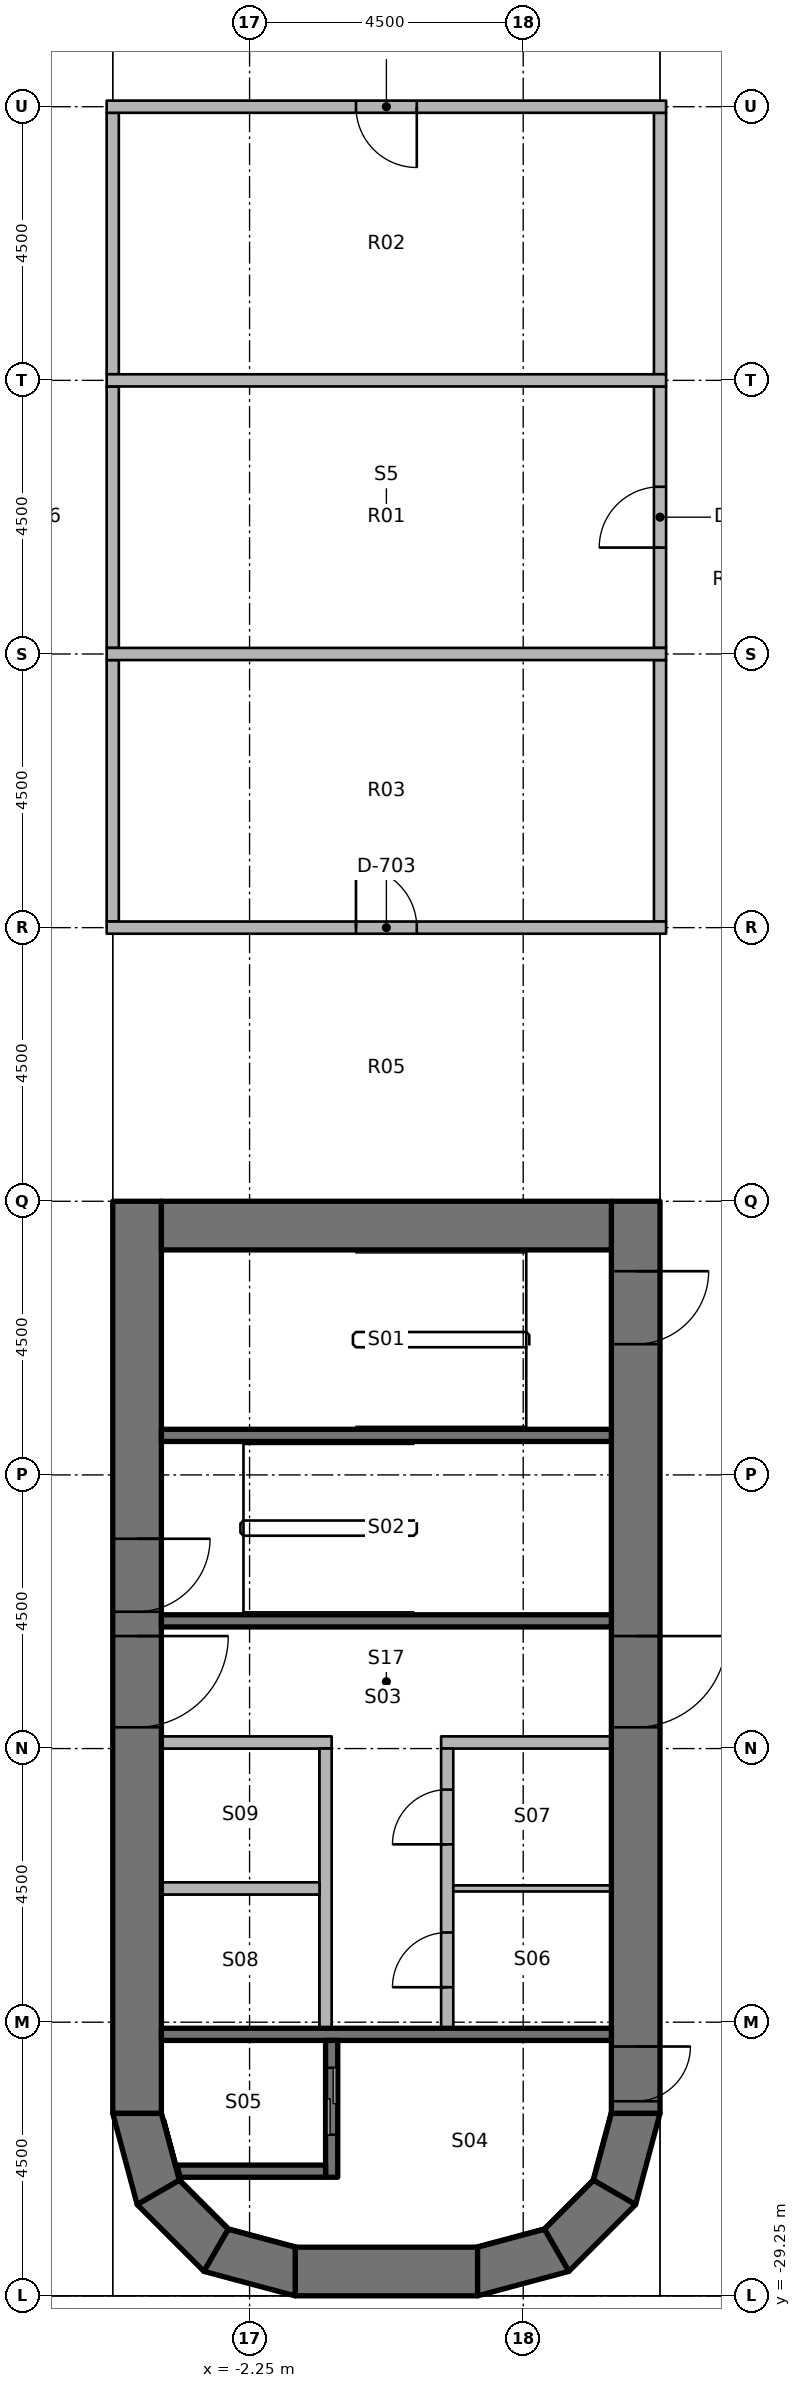
"""IFC4 building model, lengths in metres.
Left out: names, types, materials, properties, quantities, classifications, styles, units other than length and angle.
Written with IfcOpenShell. Run it as: python <this file> out.ifc"""

import sys

from ifc_helpers import new_model, si_unit, direction, frame, frame_2d, origin, place, context, subcontext, project, spatial, polyline, rectangle, outline, extrude, element, fill, save


model = new_model("IFC4")
c1 = context("Model", 3, precision=1e-05, world=origin(), true_north=direction((0.0, 1.0)))
c2 = subcontext(c1, "Body", "Model", "MODEL_VIEW")
j1 = project(units=[si_unit("LENGTHUNIT", "METRE"), si_unit("PLANEANGLEUNIT", "RADIAN")], contexts=[c1])
p1 = place(None, origin())
s1 = spatial("IfcSite", under=j1, at=p1, CompositionType="ELEMENT")
p2 = place(p1, origin())
s2 = spatial("IfcBuilding", under=s1, at=p2, CompositionType="ELEMENT")
p3 = place(p2, frame((0.0, 0.0, 94.2)))
s3 = spatial("IfcBuildingStorey", under=s2, at=p3, CompositionType="ELEMENT", Elevation=94.2)
p4 = place(p3, frame((-4.1, -11.25, 0.0), z_axis=(0.0, 0.0, 1.0), x_axis=(0.0, -1.0, 0.0)))
e1 = element("IfcWall", 1, at=p4, inside=s3, PredefinedType="SHEAR", context=c2, shape_type="SweptSolid", body=[
    extrude(rectangle(XDim=15.0, YDim=0.8, at=frame_2d((7.5, 0.0))), origin(), (0.0, 0.0, 1.0), 3.8),
])
p5 = place(p4, frame((7.15, 0.0, 0.0)))
e2 = element("IfcOpeningElement", 2, at=p5, cuts=e1, PredefinedType="OPENING", context=c2, shape_type="SweptSolid", body=[
    extrude(rectangle(XDim=1.5, YDim=2.3, at=frame_2d((0.75, 1.15))), frame((0.0, 0.41, 0.0), z_axis=(0.0, -1.0, 0.0), x_axis=(1.0, 0.0, 0.0)), (0.0, 0.0, 1.0), 0.82),
])
p6 = place(p4, frame((5.55, 0.0, 0.0)))
e3 = element("IfcOpeningElement", 3, at=p6, cuts=e1, PredefinedType="OPENING", context=c2, shape_type="SweptSolid", body=[
    extrude(rectangle(XDim=1.2, YDim=2.1, at=frame_2d((0.6, 1.05))), frame((0.0, 0.41, 0.0), z_axis=(0.0, -1.0, 0.0), x_axis=(1.0, 0.0, 0.0)), (0.0, 0.0, 1.0), 0.82),
])
p7 = place(p3, frame((4.1, -11.25, 0.0), z_axis=(0.0, 0.0, 1.0), x_axis=(0.0, -1.0, 0.0)))
e4 = element("IfcWall", 4, at=p7, inside=s3, PredefinedType="SHEAR", context=c2, shape_type="SweptSolid", body=[
    extrude(rectangle(XDim=15.0, YDim=0.8, at=frame_2d((7.5, 0.0))), origin(), (0.0, 0.0, 1.0), 3.8),
])
p8 = place(p7, frame((7.15, 0.0, 0.0)))
e5 = element("IfcOpeningElement", 5, at=p8, cuts=e4, PredefinedType="OPENING", context=c2, shape_type="SweptSolid", body=[
    extrude(rectangle(XDim=1.5, YDim=2.3, at=frame_2d((0.75, 1.15))), frame((0.0, 0.41, 0.0), z_axis=(0.0, -1.0, 0.0), x_axis=(1.0, 0.0, 0.0)), (0.0, 0.0, 1.0), 0.82),
])
p9 = place(p7, frame((13.9, 0.0, 0.0)))
e6 = element("IfcOpeningElement", 6, at=p9, cuts=e4, PredefinedType="OPENING", context=c2, shape_type="SweptSolid", body=[
    extrude(rectangle(XDim=0.9, YDim=2.1, at=frame_2d((0.45, 1.05))), frame((0.0, 0.41, 0.0), z_axis=(0.0, -1.0, 0.0), x_axis=(1.0, 0.0, 0.0)), (0.0, 0.0, 1.0), 0.82),
])
p10 = place(p7, frame((1.15, 0.0, 0.0)))
e7 = element("IfcOpeningElement", 7, at=p10, cuts=e4, PredefinedType="OPENING", context=c2, shape_type="SweptSolid", body=[
    extrude(rectangle(XDim=1.2, YDim=2.1, at=frame_2d((0.6, 1.05))), frame((0.0, 0.41, 0.0), z_axis=(0.0, -1.0, 0.0), x_axis=(1.0, 0.0, 0.0)), (0.0, 0.0, 1.0), 0.82),
])
p11 = place(p3, frame((-3.7, -11.65, 0.0), z_axis=(0.0, 0.0, 1.0), x_axis=(1.0, 0.0, 0.0)))
e8 = element("IfcWall", 8, at=p11, inside=s3, PredefinedType="SHEAR", context=c2, shape_type="SweptSolid", body=[
    extrude(rectangle(XDim=7.4, YDim=0.8, at=frame_2d((3.7, 0.0))), origin(), (0.0, 0.0, 1.0), 3.8),
])
p12 = place(p3, frame((-1.5, -28.85, 0.0), z_axis=(0.0, 0.0, 1.0), x_axis=(1.0, 0.0, 0.0)))
e9 = element("IfcWall", 9, at=p12, inside=s3, PredefinedType="SHEAR", context=c2, shape_type="SweptSolid", body=[
    extrude(rectangle(XDim=3.0, YDim=0.8, at=frame_2d((1.5, 0.0))), origin(), (0.0, 0.0, 1.0), 3.8),
])
p13 = place(p3, origin())
e10 = element("IfcWall", 10, at=p13, inside=s3, PredefinedType="SHEAR", context=c2, shape_type="SweptSolid", body=[
    extrude(outline(polyline([(-4.5, -26.25), (-4.098, -27.75), (-3.405, -27.35), (-3.7, -26.25), (-4.5, -26.25)])), origin(), (0.0, 0.0, 1.0), 3.8),
])
p14 = place(p3, origin())
e11 = element("IfcWall", 11, at=p14, inside=s3, PredefinedType="SHEAR", context=c2, shape_type="SweptSolid", body=[
    extrude(outline(polyline([(-4.098, -27.75), (-3.0, -28.848), (-2.6, -28.155), (-3.405, -27.35), (-4.098, -27.75)])), origin(), (0.0, 0.0, 1.0), 3.8),
])
p15 = place(p3, origin())
e12 = element("IfcWall", 12, at=p15, inside=s3, PredefinedType="SHEAR", context=c2, shape_type="SweptSolid", body=[
    extrude(outline(polyline([(-3.0, -28.848), (-1.5, -29.25), (-1.5, -28.45), (-2.6, -28.155), (-3.0, -28.848)])), origin(), (0.0, 0.0, 1.0), 3.8),
])
p16 = place(p3, origin())
e13 = element("IfcWall", 13, at=p16, inside=s3, PredefinedType="SHEAR", context=c2, shape_type="SweptSolid", body=[
    extrude(outline(polyline([(4.5, -26.25), (4.098, -27.75), (3.405, -27.35), (3.7, -26.25), (4.5, -26.25)])), origin(), (0.0, 0.0, 1.0), 3.8),
])
p17 = place(p3, origin())
e14 = element("IfcWall", 14, at=p17, inside=s3, PredefinedType="SHEAR", context=c2, shape_type="SweptSolid", body=[
    extrude(outline(polyline([(4.098, -27.75), (3.0, -28.848), (2.6, -28.155), (3.405, -27.35), (4.098, -27.75)])), origin(), (0.0, 0.0, 1.0), 3.8),
])
p18 = place(p3, origin())
e15 = element("IfcWall", 15, at=p18, inside=s3, PredefinedType="SHEAR", context=c2, shape_type="SweptSolid", body=[
    extrude(outline(polyline([(3.0, -28.848), (1.5, -29.25), (1.5, -28.45), (2.6, -28.155), (3.0, -28.848)])), origin(), (0.0, 0.0, 1.0), 3.8),
])
p19 = place(p3, frame((3.7, -24.95, 0.0), z_axis=(0.0, 0.0, 1.0), x_axis=(-1.0, 0.0, 0.0)))
e16 = element("IfcWall", 16, at=p19, inside=s3, PredefinedType="SHEAR", context=c2, shape_type="SweptSolid", body=[
    extrude(rectangle(XDim=7.4, YDim=0.2, at=frame_2d((3.7, 0.0))), origin(), (0.0, 0.0, 1.0), 3.65),
])
p20 = place(p3, frame((-0.9, -27.3, 0.0), z_axis=(0.0, 0.0, 1.0), x_axis=(0.0, 1.0, 0.0)))
e17 = element("IfcWall", 17, at=p20, inside=s3, PredefinedType="SHEAR", context=c2, shape_type="SweptSolid", body=[
    extrude(rectangle(XDim=2.25, YDim=0.2, at=frame_2d((1.125, 0.0))), origin(), (0.0, 0.0, 1.0), 3.65),
])
p21 = place(p20, frame((0.7, 0.0, 0.0)))
e18 = element("IfcOpeningElement", 18, at=p21, cuts=e17, PredefinedType="OPENING", context=c2, shape_type="SweptSolid", body=[
    extrude(rectangle(XDim=1.1, YDim=2.3, at=frame_2d((0.55, 1.15))), frame((0.0, 0.11, 0.0), z_axis=(0.0, -1.0, 0.0), x_axis=(1.0, 0.0, 0.0)), (0.0, 0.0, 1.0), 0.22),
])
p22 = place(p3, origin())
e19 = element("IfcWall", 19, at=p22, inside=s3, PredefinedType="SHEAR", context=c2, shape_type="SweptSolid", body=[
    extrude(outline(polyline([(-1.0, -27.1), (-3.444, -27.1), (-3.39, -27.3), (-1.0, -27.3), (-1.0, -27.1)])), origin(), (0.0, 0.0, 1.0), 3.65),
])
for number, where, z_axis, x_axis in (
    (20, (3.7, -18.15, 0.0), (0.0, 0.0, 1.0), (-1.0, 0.0, 0.0)),
    (21, (3.7, -15.1, 0.0), (0.0, 0.0, 1.0), (-1.0, 0.0, 0.0)),
):
    element("IfcWall", number, at=place(p3, frame(where, z_axis=z_axis, x_axis=x_axis)), inside=s3, PredefinedType="SHEAR", context=c2, shape_type="SweptSolid", body=[
        extrude(rectangle(XDim=7.4, YDim=0.2, at=frame_2d((3.7, 0.0))), origin(), (0.0, 0.0, 1.0), 3.65),
    ])
p23 = place(p3, frame((3.7, -20.15, 0.0), z_axis=(0.0, 0.0, 1.0), x_axis=(-1.0, 0.0, 0.0)))
e22 = element("IfcWall", 22, at=p23, inside=s3, PredefinedType="PARTITIONING", context=c2, shape_type="SweptSolid", body=[
    extrude(rectangle(XDim=2.8, YDim=0.2, at=frame_2d((1.4, 0.0))), origin(), (0.0, 0.0, 1.0), 3.65),
])
p24 = place(p3, frame((1.0, -24.85, 0.0), z_axis=(0.0, 0.0, 1.0), x_axis=(0.0, 1.0, 0.0)))
e23 = element("IfcWall", 23, at=p24, inside=s3, PredefinedType="PARTITIONING", context=c2, shape_type="SweptSolid", body=[
    extrude(rectangle(XDim=4.6, YDim=0.2, at=frame_2d((2.3, 0.0))), origin(), (0.0, 0.0, 1.0), 3.65),
])
p25 = place(p24, frame((0.675, 0.0, 0.0)))
e24 = element("IfcOpeningElement", 24, at=p25, cuts=e23, PredefinedType="OPENING", context=c2, shape_type="SweptSolid", body=[
    extrude(rectangle(XDim=0.9, YDim=2.1, at=frame_2d((0.45, 1.05))), frame((0.0, 0.11, 0.0), z_axis=(0.0, -1.0, 0.0), x_axis=(1.0, 0.0, 0.0)), (0.0, 0.0, 1.0), 0.22),
])
p26 = place(p24, frame((3.025, 0.0, 0.0)))
e25 = element("IfcOpeningElement", 25, at=p26, cuts=e23, PredefinedType="OPENING", context=c2, shape_type="SweptSolid", body=[
    extrude(rectangle(XDim=0.9, YDim=2.1, at=frame_2d((0.45, 1.05))), frame((0.0, 0.11, 0.0), z_axis=(0.0, -1.0, 0.0), x_axis=(1.0, 0.0, 0.0)), (0.0, 0.0, 1.0), 0.22),
])
p27 = place(p3, frame((-0.9, -20.15, 0.0), z_axis=(0.0, 0.0, 1.0), x_axis=(-1.0, 0.0, 0.0)))
e26 = element("IfcWall", 26, at=p27, inside=s3, PredefinedType="PARTITIONING", context=c2, shape_type="SweptSolid", body=[
    extrude(rectangle(XDim=2.8, YDim=0.2, at=frame_2d((1.4, 0.0))), origin(), (0.0, 0.0, 1.0), 3.65),
])
p28 = place(p3, frame((-1.0, -24.85, 0.0), z_axis=(0.0, 0.0, 1.0), x_axis=(0.0, 1.0, 0.0)))
e27 = element("IfcWall", 27, at=p28, inside=s3, PredefinedType="PARTITIONING", context=c2, shape_type="SweptSolid", body=[
    extrude(rectangle(XDim=4.6, YDim=0.2, at=frame_2d((2.3, 0.0))), origin(), (0.0, 0.0, 1.0), 3.65),
])
p29 = place(p3, frame((3.7, -22.55, 0.0), z_axis=(0.0, 0.0, 1.0), x_axis=(-1.0, 0.0, 0.0)))
e28 = element("IfcWall", 28, at=p29, inside=s3, PredefinedType="PARTITIONING", context=c2, shape_type="SweptSolid", body=[
    extrude(rectangle(XDim=2.6, YDim=0.1, at=frame_2d((1.3, 0.0))), origin(), (0.0, 0.0, 1.0), 3.65),
])
p30 = place(p3, frame((-1.1, -22.55, 0.0), z_axis=(0.0, 0.0, 1.0), x_axis=(-1.0, 0.0, 0.0)))
e29 = element("IfcWall", 29, at=p30, inside=s3, PredefinedType="PARTITIONING", context=c2, shape_type="SweptSolid", body=[
    extrude(rectangle(XDim=2.6, YDim=0.2, at=frame_2d((1.3, 0.0))), origin(), (0.0, 0.0, 1.0), 3.65),
])
for number, where, z_axis, x_axis in (
    (30, (-4.5, 2.35, 0.0), (0.0, 0.0, 1.0), (0.0, 1.0, 0.0)),
    (31, (-4.5, -2.15, 0.0), (0.0, 0.0, 1.0), (0.0, 1.0, 0.0)),
    (32, (-4.5, -6.65, 0.0), (0.0, 0.0, 1.0), (0.0, 1.0, 0.0)),
    (33, (4.5, 2.35, 0.0), (0.0, 0.0, 1.0), (0.0, 1.0, 0.0)),
):
    element("IfcWall", number, at=place(p3, frame(where, z_axis=z_axis, x_axis=x_axis)), inside=s3, PredefinedType="PARTITIONING", context=c2, shape_type="SweptSolid", body=[
        extrude(rectangle(XDim=4.3, YDim=0.2, at=frame_2d((2.15, 0.0))), origin(), (0.0, 0.0, 1.0), 2.738),
    ])
p31 = place(p3, frame((4.5, -2.15, 0.0), z_axis=(0.0, 0.0, 1.0), x_axis=(0.0, 1.0, 0.0)))
e34 = element("IfcWall", 34, at=p31, inside=s3, PredefinedType="PARTITIONING", context=c2, shape_type="SweptSolid", body=[
    extrude(rectangle(XDim=4.3, YDim=0.2, at=frame_2d((2.15, 0.0))), origin(), (0.0, 0.0, 1.0), 2.738),
])
p32 = place(p31, frame((1.65, 0.0, 0.0)))
e35 = element("IfcOpeningElement", 35, at=p32, cuts=e34, PredefinedType="OPENING", context=c2, shape_type="SweptSolid", body=[
    extrude(rectangle(XDim=1.0, YDim=2.1, at=frame_2d((0.5, 1.05))), frame((0.0, 0.11, 0.0), z_axis=(0.0, -1.0, 0.0), x_axis=(1.0, 0.0, 0.0)), (0.0, 0.0, 1.0), 0.22),
])
p33 = place(p3, frame((4.5, -6.65, 0.0), z_axis=(0.0, 0.0, 1.0), x_axis=(0.0, 1.0, 0.0)))
e36 = element("IfcWall", 36, at=p33, inside=s3, PredefinedType="PARTITIONING", context=c2, shape_type="SweptSolid", body=[
    extrude(rectangle(XDim=4.3, YDim=0.2, at=frame_2d((2.15, 0.0))), origin(), (0.0, 0.0, 1.0), 2.738),
])
p34 = place(p3, frame((4.6, 6.75, 0.0), z_axis=(0.0, 0.0, 1.0), x_axis=(-1.0, 0.0, 0.0)))
e37 = element("IfcWall", 37, at=p34, inside=s3, PredefinedType="PARTITIONING", context=c2, shape_type="SweptSolid", body=[
    extrude(rectangle(XDim=9.2, YDim=0.2, at=frame_2d((4.6, 0.0))), origin(), (0.0, 0.0, 1.0), 2.738),
])
p35 = place(p34, frame((4.1, 0.0, 0.0)))
e38 = element("IfcOpeningElement", 38, at=p35, cuts=e37, PredefinedType="OPENING", context=c2, shape_type="SweptSolid", body=[
    extrude(rectangle(XDim=1.0, YDim=2.1, at=frame_2d((0.5, 1.05))), frame((0.0, 0.11, 0.0), z_axis=(0.0, -1.0, 0.0), x_axis=(1.0, 0.0, 0.0)), (0.0, 0.0, 1.0), 0.22),
])
p36 = place(p3, frame((-4.6, -6.75, 0.0), z_axis=(0.0, 0.0, 1.0), x_axis=(1.0, 0.0, 0.0)))
e39 = element("IfcWall", 39, at=p36, inside=s3, PredefinedType="PARTITIONING", context=c2, shape_type="SweptSolid", body=[
    extrude(rectangle(XDim=9.2, YDim=0.2, at=frame_2d((4.6, 0.0))), origin(), (0.0, 0.0, 1.0), 2.738),
])
p37 = place(p36, frame((4.1, 0.0, 0.0)))
e40 = element("IfcOpeningElement", 40, at=p37, cuts=e39, PredefinedType="OPENING", context=c2, shape_type="SweptSolid", body=[
    extrude(rectangle(XDim=1.0, YDim=2.1, at=frame_2d((0.5, 1.05))), frame((0.0, 0.11, 0.0), z_axis=(0.0, -1.0, 0.0), x_axis=(1.0, 0.0, 0.0)), (0.0, 0.0, 1.0), 0.22),
])
for number, where, z_axis, x_axis in (
    (41, (-4.6, 2.25, 0.0), (0.0, 0.0, 1.0), (1.0, 0.0, 0.0)),
    (42, (-4.6, -2.25, 0.0), (0.0, 0.0, 1.0), (1.0, 0.0, 0.0)),
):
    element("IfcWall", number, at=place(p3, frame(where, z_axis=z_axis, x_axis=x_axis)), inside=s3, PredefinedType="PARTITIONING", context=c2, shape_type="SweptSolid", body=[
        extrude(rectangle(XDim=9.2, YDim=0.2, at=frame_2d((4.6, 0.0))), origin(), (0.0, 0.0, 1.0), 2.738),
    ])
p38 = place(p8, origin())
e43 = element("IfcDoor", 43, at=p38, inside=s3, OperationType="DOUBLE_DOOR_SINGLE_SWING", PredefinedType="DOOR", context=c2, shape_type="SweptSolid", body=[
    extrude(rectangle(XDim=1.5, YDim=2.3, at=frame_2d((0.75, 1.15))), frame((0.0, 0.025, 0.0), z_axis=(0.0, -1.0, 0.0), x_axis=(1.0, 0.0, 0.0)), (0.0, 0.0, 1.0), 0.05),
])
fill(e5, e43)
p39 = place(p5, origin())
e44 = element("IfcDoor", 44, at=p39, inside=s3, OperationType="DOUBLE_DOOR_SINGLE_SWING", PredefinedType="DOOR", context=c2, shape_type="SweptSolid", body=[
    extrude(rectangle(XDim=1.5, YDim=2.3, at=frame_2d((0.75, 1.15))), frame((0.0, 0.025, 0.0), z_axis=(0.0, -1.0, 0.0), x_axis=(1.0, 0.0, 0.0)), (0.0, 0.0, 1.0), 0.05),
])
fill(e2, e44)
p40 = place(p9, origin())
e45 = element("IfcDoor", 45, at=p40, inside=s3, OperationType="SINGLE_SWING_RIGHT", PredefinedType="DOOR", context=c2, shape_type="SweptSolid", body=[
    extrude(rectangle(XDim=0.9, YDim=2.1, at=frame_2d((0.45, 1.05))), frame((0.0, 0.025, 0.0), z_axis=(0.0, -1.0, 0.0), x_axis=(1.0, 0.0, 0.0)), (0.0, 0.0, 1.0), 0.05),
])
fill(e6, e45)
p41 = place(p6, origin())
e46 = element("IfcDoor", 46, at=p41, inside=s3, OperationType="SINGLE_SWING_LEFT", PredefinedType="DOOR", context=c2, shape_type="SweptSolid", body=[
    extrude(rectangle(XDim=1.2, YDim=2.1, at=frame_2d((0.6, 1.05))), frame((0.0, 0.025, 0.0), z_axis=(0.0, -1.0, 0.0), x_axis=(1.0, 0.0, 0.0)), (0.0, 0.0, 1.0), 0.05),
])
fill(e3, e46)
p42 = place(p10, origin())
e47 = element("IfcDoor", 47, at=p42, inside=s3, OperationType="SINGLE_SWING_LEFT", PredefinedType="DOOR", context=c2, shape_type="SweptSolid", body=[
    extrude(rectangle(XDim=1.2, YDim=2.1, at=frame_2d((0.6, 1.05))), frame((0.0, 0.025, 0.0), z_axis=(0.0, -1.0, 0.0), x_axis=(1.0, 0.0, 0.0)), (0.0, 0.0, 1.0), 0.05),
])
fill(e7, e47)
p43 = place(p21, origin())
e48 = element("IfcDoor", 48, at=p43, inside=s3, OperationType="DOUBLE_DOOR_SLIDING", PredefinedType="DOOR", context=c2, shape_type="SweptSolid", body=[
    extrude(rectangle(XDim=1.1, YDim=2.3, at=frame_2d((0.55, 1.15))), frame((0.0, 0.025, 0.0), z_axis=(0.0, -1.0, 0.0), x_axis=(1.0, 0.0, 0.0)), (0.0, 0.0, 1.0), 0.05),
])
fill(e18, e48)
p44 = place(p25, origin())
e49 = element("IfcDoor", 49, at=p44, inside=s3, OperationType="SINGLE_SWING_RIGHT", PredefinedType="DOOR", context=c2, shape_type="SweptSolid", body=[
    extrude(rectangle(XDim=0.9, YDim=2.1, at=frame_2d((0.45, 1.05))), frame((0.0, 0.025, 0.0), z_axis=(0.0, -1.0, 0.0), x_axis=(1.0, 0.0, 0.0)), (0.0, 0.0, 1.0), 0.05),
])
fill(e24, e49)
p45 = place(p26, origin())
e50 = element("IfcDoor", 50, at=p45, inside=s3, OperationType="SINGLE_SWING_RIGHT", PredefinedType="DOOR", context=c2, shape_type="SweptSolid", body=[
    extrude(rectangle(XDim=0.9, YDim=2.1, at=frame_2d((0.45, 1.05))), frame((0.0, 0.025, 0.0), z_axis=(0.0, -1.0, 0.0), x_axis=(1.0, 0.0, 0.0)), (0.0, 0.0, 1.0), 0.05),
])
fill(e25, e50)
p46 = place(p32, origin())
e51 = element("IfcDoor", 51, at=p46, inside=s3, OperationType="SINGLE_SWING_RIGHT", PredefinedType="DOOR", context=c2, shape_type="SweptSolid", body=[
    extrude(rectangle(XDim=1.0, YDim=2.1, at=frame_2d((0.5, 1.05))), frame((0.0, 0.025, 0.0), z_axis=(0.0, -1.0, 0.0), x_axis=(1.0, 0.0, 0.0)), (0.0, 0.0, 1.0), 0.05),
])
fill(e35, e51)
p47 = place(p35, origin())
e52 = element("IfcDoor", 52, at=p47, inside=s3, OperationType="SINGLE_SWING_RIGHT", PredefinedType="DOOR", context=c2, shape_type="SweptSolid", body=[
    extrude(rectangle(XDim=1.0, YDim=2.1, at=frame_2d((0.5, 1.05))), frame((0.0, 0.025, 0.0), z_axis=(0.0, -1.0, 0.0), x_axis=(1.0, 0.0, 0.0)), (0.0, 0.0, 1.0), 0.05),
])
fill(e38, e52)
p48 = place(p37, origin())
e53 = element("IfcDoor", 53, at=p48, inside=s3, OperationType="SINGLE_SWING_RIGHT", PredefinedType="DOOR", context=c2, shape_type="SweptSolid", body=[
    extrude(rectangle(XDim=1.0, YDim=2.1, at=frame_2d((0.5, 1.05))), frame((0.0, 0.025, 0.0), z_axis=(0.0, -1.0, 0.0), x_axis=(1.0, 0.0, 0.0)), (0.0, 0.0, 1.0), 0.05),
])
fill(e40, e53)
save(model, sys.argv[1])
